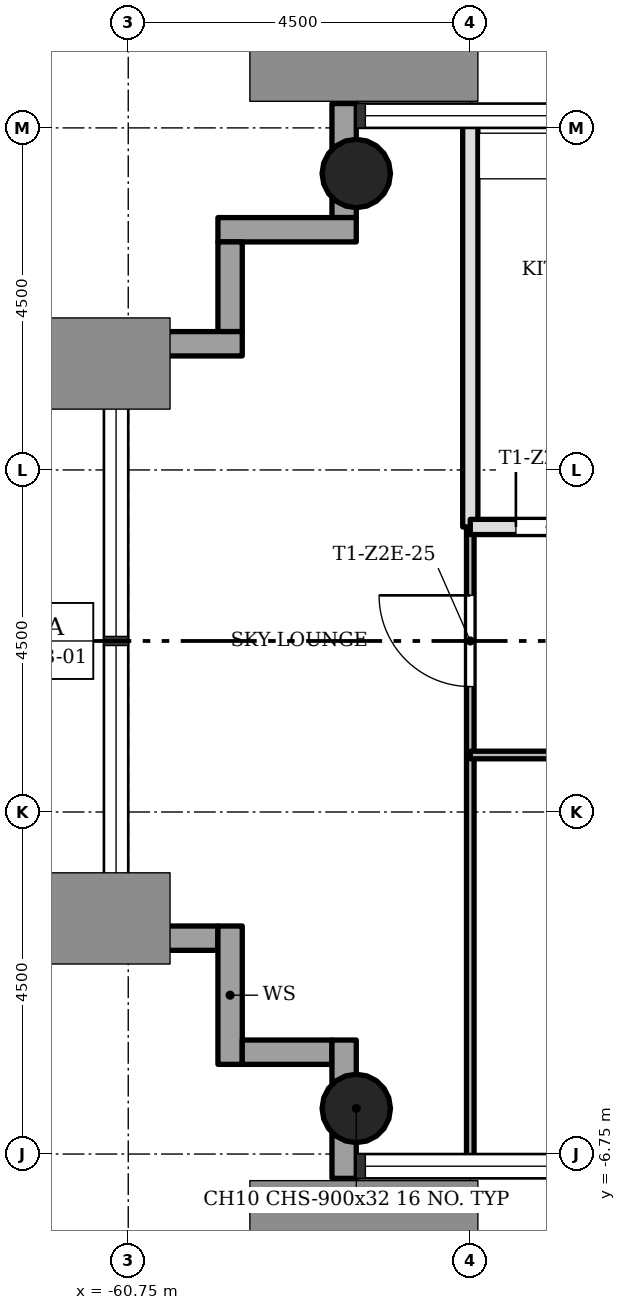
"""IFC4 building model, lengths in metres.
Left out: names, types, materials, properties, quantities, classifications, styles, units other than length and angle.
Written with IfcOpenShell. Run it as: python <this file> out.ifc"""

import sys

from ifc_helpers import new_model, si_unit, direction, frame, frame_2d, origin, origin_2d, place, context, subcontext, project, spatial, rectangle, hollow_circle, extrude, element, fill, save


model = new_model("IFC4")
c1 = context("Model", 3, precision=1e-05, world=origin(), true_north=direction((0.0, 1.0)))
c2 = subcontext(c1, "Body", "Model", "MODEL_VIEW")
j1 = project(units=[si_unit("LENGTHUNIT", "METRE"), si_unit("PLANEANGLEUNIT", "RADIAN")], contexts=[c1])
p1 = place(None, origin())
s1 = spatial("IfcSite", under=j1, at=p1, CompositionType="ELEMENT")
p2 = place(p1, origin())
s2 = spatial("IfcBuilding", under=s1, at=p2, CompositionType="ELEMENT")
p3 = place(p2, frame((0.0, 0.0, 100.4)))
s3 = spatial("IfcBuildingStorey", under=s2, at=p3, CompositionType="ELEMENT", Elevation=100.4)
for number, where, z_axis, x_axis in (
    (1, (-57.75, -6.15, 0.0), (0.0, 0.0, 1.0), (1.0, 0.0, 0.0)),
    (2, (-57.75, 6.15, 0.0), (0.0, 0.0, 1.0), (1.0, 0.0, 0.0)),
):
    element("IfcColumn", number, at=place(p3, frame(where, z_axis=z_axis, x_axis=x_axis)), inside=s3, PredefinedType="COLUMN", context=c2, shape_type="SweptSolid", body=[
        extrude(hollow_circle(Radius=0.45, WallThickness=0.032, at=origin_2d()), origin(), (0.0, 0.0, 1.0), 3.4),
    ])
p4 = place(p3, frame((-61.07, -3.91, -0.3), z_axis=(0.0, 0.0, 1.0), x_axis=(1.0, 0.0, 0.0)))
e3 = element("IfcWall", 3, at=p4, inside=s3, PredefinedType="STANDARD", context=c2, shape_type="SweptSolid", body=[
    extrude(rectangle(XDim=1.5, YDim=0.32, at=frame_2d((0.75, 0.0))), origin(), (0.0, 0.0, 1.0), 3.4),
])
p5 = place(p3, frame((-59.41, -3.75, -0.3), z_axis=(0.0, 0.0, 1.0), x_axis=(0.0, -1.0, 0.0)))
e4 = element("IfcWall", 4, at=p5, inside=s3, PredefinedType="STANDARD", context=c2, shape_type="SweptSolid", body=[
    extrude(rectangle(XDim=1.82, YDim=0.32, at=frame_2d((0.91, 0.0))), origin(), (0.0, 0.0, 1.0), 3.4),
])
p6 = place(p3, frame((-59.25, -5.41, -0.3), z_axis=(0.0, 0.0, 1.0), x_axis=(1.0, 0.0, 0.0)))
e5 = element("IfcWall", 5, at=p6, inside=s3, PredefinedType="STANDARD", context=c2, shape_type="SweptSolid", body=[
    extrude(rectangle(XDim=1.18, YDim=0.32, at=frame_2d((0.59, 0.0))), origin(), (0.0, 0.0, 1.0), 3.4),
])
p7 = place(p3, frame((-57.91, -5.25, -0.3), z_axis=(0.0, 0.0, 1.0), x_axis=(0.0, -1.0, 0.0)))
e6 = element("IfcWall", 6, at=p7, inside=s3, PredefinedType="STANDARD", context=c2, shape_type="SweptSolid", body=[
    extrude(rectangle(XDim=1.82, YDim=0.32, at=frame_2d((0.91, 0.0))), origin(), (0.0, 0.0, 1.0), 3.4),
])
p8 = place(p3, frame((-57.91, 7.07, -0.3), z_axis=(0.0, 0.0, 1.0), x_axis=(0.0, -1.0, 0.0)))
e7 = element("IfcWall", 7, at=p8, inside=s3, PredefinedType="STANDARD", context=c2, shape_type="SweptSolid", body=[
    extrude(rectangle(XDim=1.5, YDim=0.32, at=frame_2d((0.75, 0.0))), origin(), (0.0, 0.0, 1.0), 3.4),
])
p9 = place(p3, frame((-57.75, 5.41, -0.3), z_axis=(0.0, 0.0, 1.0), x_axis=(-1.0, 0.0, 0.0)))
e8 = element("IfcWall", 8, at=p9, inside=s3, PredefinedType="STANDARD", context=c2, shape_type="SweptSolid", body=[
    extrude(rectangle(XDim=1.82, YDim=0.32, at=frame_2d((0.91, 0.0))), origin(), (0.0, 0.0, 1.0), 3.4),
])
p10 = place(p3, frame((-59.41, 5.25, -0.3), z_axis=(0.0, 0.0, 1.0), x_axis=(0.0, -1.0, 0.0)))
e9 = element("IfcWall", 9, at=p10, inside=s3, PredefinedType="STANDARD", context=c2, shape_type="SweptSolid", body=[
    extrude(rectangle(XDim=1.18, YDim=0.32, at=frame_2d((0.59, 0.0))), origin(), (0.0, 0.0, 1.0), 3.4),
])
p11 = place(p3, frame((-59.25, 3.91, -0.3), z_axis=(0.0, 0.0, 1.0), x_axis=(-1.0, 0.0, 0.0)))
e10 = element("IfcWall", 10, at=p11, inside=s3, PredefinedType="STANDARD", context=c2, shape_type="SweptSolid", body=[
    extrude(rectangle(XDim=1.82, YDim=0.32, at=frame_2d((0.91, 0.0))), origin(), (0.0, 0.0, 1.0), 3.4),
])
p12 = place(p3, frame((-56.25, -6.85, 0.0), z_axis=(0.0, 0.0, 1.0), x_axis=(0.0, 1.0, 0.0)))
e11 = element("IfcWall", 11, at=p12, inside=s3, PredefinedType="PARTITIONING", context=c2, shape_type="SweptSolid", body=[
    extrude(rectangle(XDim=8.35, YDim=0.1, at=frame_2d((4.175, 0.0))), origin(), (0.0, 0.0, 1.0), 3.0),
])
p13 = place(p12, frame((6.25, 0.0, 0.0)))
e12 = element("IfcOpeningElement", 12, at=p13, cuts=e11, PredefinedType="OPENING", context=c2, shape_type="SweptSolid", body=[
    extrude(rectangle(XDim=1.2, YDim=2.1, at=frame_2d((0.6, 1.05))), frame((0.0, 0.06, 0.0), z_axis=(0.0, -1.0, 0.0), x_axis=(1.0, 0.0, 0.0)), (0.0, 0.0, 1.0), 0.12),
])
p14 = place(p3, frame((-56.25, 1.5, 0.0), z_axis=(0.0, 0.0, 1.0), x_axis=(0.0, 1.0, 0.0)))
e13 = element("IfcWall", 13, at=p14, inside=s3, PredefinedType="SOLIDWALL", context=c2, shape_type="SweptSolid", body=[
    extrude(rectangle(XDim=5.35, YDim=0.2, at=frame_2d((2.675, 0.0))), origin(), (0.0, 0.0, 1.0), 3.0),
])
p15 = place(p3, frame((-56.25, -1.5, 0.0), z_axis=(0.0, 0.0, 1.0), x_axis=(1.0, 0.0, 0.0)))
e14 = element("IfcWall", 14, at=p15, inside=s3, PredefinedType="PARTITIONING", context=c2, shape_type="SweptSolid", body=[
    extrude(rectangle(XDim=4.5, YDim=0.1, at=frame_2d((2.25, 0.0))), origin(), (0.0, 0.0, 1.0), 3.0),
])
p16 = place(p15, frame((1.8, 0.0, 0.0)))
e15 = element("IfcOpeningElement", 15, at=p16, cuts=e14, PredefinedType="OPENING", context=c2, shape_type="SweptSolid", body=[
    extrude(rectangle(XDim=0.9, YDim=2.1, at=frame_2d((0.45, 1.05))), frame((0.0, 0.06, 0.0), z_axis=(0.0, -1.0, 0.0), x_axis=(1.0, 0.0, 0.0)), (0.0, 0.0, 1.0), 0.12),
])
p17 = place(p3, frame((-56.25, 1.5, 0.0), z_axis=(0.0, 0.0, 1.0), x_axis=(1.0, 0.0, 0.0)))
e16 = element("IfcWall", 16, at=p17, inside=s3, PredefinedType="SOLIDWALL", context=c2, shape_type="SweptSolid", body=[
    extrude(rectangle(XDim=4.5, YDim=0.2, at=frame_2d((2.25, 0.0))), origin(), (0.0, 0.0, 1.0), 3.0),
])
p18 = place(p17, frame((0.6, 0.0, 0.0)))
e17 = element("IfcOpeningElement", 17, at=p18, cuts=e16, PredefinedType="OPENING", context=c2, shape_type="SweptSolid", body=[
    extrude(rectangle(XDim=0.9, YDim=2.1, at=frame_2d((0.45, 1.05))), frame((0.0, 0.11, 0.0), z_axis=(0.0, -1.0, 0.0), x_axis=(1.0, 0.0, 0.0)), (0.0, 0.0, 1.0), 0.22),
])
p19 = place(p18, origin())
e18 = element("IfcDoor", 18, at=p19, inside=s3, OperationType="SINGLE_SWING_RIGHT", PredefinedType="DOOR", context=c2, shape_type="SweptSolid", body=[
    extrude(rectangle(XDim=0.9, YDim=2.1, at=frame_2d((0.45, 1.05))), frame((0.0, 0.025, 0.0), z_axis=(0.0, -1.0, 0.0), x_axis=(1.0, 0.0, 0.0)), (0.0, 0.0, 1.0), 0.05),
])
fill(e17, e18)
p20 = place(p13, origin())
e19 = element("IfcDoor", 19, at=p20, inside=s3, OperationType="SINGLE_SWING_LEFT", PredefinedType="DOOR", context=c2, shape_type="SweptSolid", body=[
    extrude(rectangle(XDim=1.2, YDim=2.1, at=frame_2d((0.6, 1.05))), frame((0.0, 0.025, 0.0), z_axis=(0.0, -1.0, 0.0), x_axis=(1.0, 0.0, 0.0)), (0.0, 0.0, 1.0), 0.05),
])
fill(e12, e19)
save(model, sys.argv[1])
